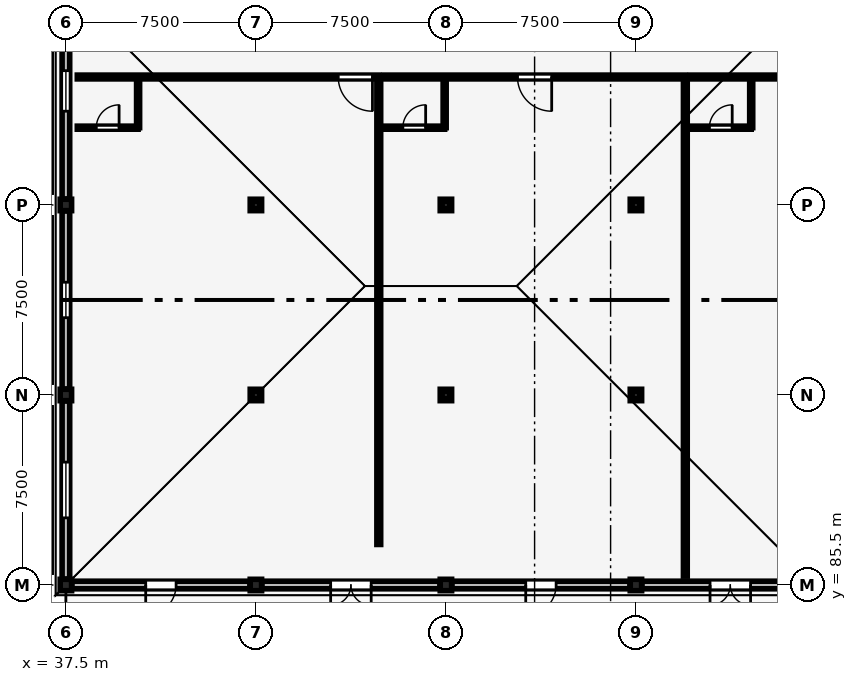
"""IFC4 building model, lengths in metres.
Left out: names, types, materials, properties, quantities, classifications, styles, units other than length and angle.
Written with IfcOpenShell. Run it as: python <this file> out.ifc"""

import sys

from ifc_helpers import new_model, si_unit, direction, frame, frame_2d, origin, origin_2d, place, context, subcontext, project, spatial, rectangle, i_section, extrude, element, fill, save


model = new_model("IFC4")
c1 = context("Model", 3, precision=1e-05, world=origin(), true_north=direction((0.0, 1.0)))
c2 = subcontext(c1, "Body", "Model", "MODEL_VIEW")
j1 = project(units=[si_unit("LENGTHUNIT", "METRE"), si_unit("PLANEANGLEUNIT", "RADIAN")], contexts=[c1])
p1 = place(None, origin())
s1 = spatial("IfcSite", under=j1, at=p1, CompositionType="ELEMENT")
p2 = place(p1, origin())
s2 = spatial("IfcBuilding", under=s1, at=p2, CompositionType="ELEMENT")
p3 = place(p2, frame((0.0, 0.0, 17.85)))
s3 = spatial("IfcBuildingStorey", under=s2, at=p3, CompositionType="ELEMENT", Elevation=17.85)
for number, where, z_axis, x_axis in (
    (1, (37.5, 85.5, 0.0), (0.0, 0.0, 1.0), (1.0, 0.0, 0.0)),
    (2, (37.5, 93.0, 0.0), (0.0, 0.0, 1.0), (1.0, 0.0, 0.0)),
    (3, (37.5, 100.5, 0.0), (0.0, 0.0, 1.0), (1.0, 0.0, 0.0)),
    (4, (45.0, 85.5, 0.0), (0.0, 0.0, 1.0), (1.0, 0.0, 0.0)),
    (5, (45.0, 93.0, 0.0), (0.0, 0.0, 1.0), (1.0, 0.0, 0.0)),
    (6, (45.0, 100.5, 0.0), (0.0, 0.0, 1.0), (1.0, 0.0, 0.0)),
    (7, (52.5, 85.5, 0.0), (0.0, 0.0, 1.0), (1.0, 0.0, 0.0)),
    (8, (52.5, 93.0, 0.0), (0.0, 0.0, 1.0), (1.0, 0.0, 0.0)),
    (9, (52.5, 100.5, 0.0), (0.0, 0.0, 1.0), (1.0, 0.0, 0.0)),
    (10, (60.0, 85.5, 0.0), (0.0, 0.0, 1.0), (1.0, 0.0, 0.0)),
    (11, (60.0, 93.0, 0.0), (0.0, 0.0, 1.0), (1.0, 0.0, 0.0)),
    (12, (60.0, 100.5, 0.0), (0.0, 0.0, 1.0), (1.0, 0.0, 0.0)),
):
    element("IfcColumn", number, at=place(p3, frame(where, z_axis=z_axis, x_axis=x_axis)), inside=s3, PredefinedType="COLUMN", context=c2, shape_type="SweptSolid", body=[
        extrude(rectangle(XDim=0.45, YDim=0.45, at=origin_2d()), origin(), (0.0, 0.0, 1.0), 4.05),
    ])
for number, where, z_axis, x_axis in (
    (13, (45.0, 93.0, 4.05), (0.0, 0.0, 1.0), (1.0, 0.0, 0.0)),
    (14, (45.0, 100.5, 4.05), (0.0, 0.0, 1.0), (1.0, 0.0, 0.0)),
    (15, (52.5, 93.0, 4.05), (0.0, 0.0, 1.0), (1.0, 0.0, 0.0)),
):
    element("IfcColumn", number, at=place(p3, frame(where, z_axis=z_axis, x_axis=x_axis)), inside=s3, PredefinedType="COLUMN", context=c2, shape_type="SweptSolid", body=[
        extrude(i_section(OverallWidth=0.3, OverallDepth=0.3, WebThickness=0.011, FlangeThickness=0.019, FilletRadius=0.027, at=origin_2d()), origin(), (0.0, 0.0, 1.0), 1.97),
    ])
p4 = place(p3, frame((52.5, 100.5, 4.05), z_axis=(0.0, 0.0, 1.0), x_axis=(1.0, 0.0, 0.0)))
e16 = element("IfcColumn", 16, at=p4, inside=s3, PredefinedType="COLUMN", context=c2, shape_type="SweptSolid", body=[
    extrude(i_section(OverallWidth=0.3, OverallDepth=0.3, WebThickness=0.011, FlangeThickness=0.019, FilletRadius=0.027, at=origin_2d()), origin(), (0.0, 0.0, 1.0), 2.24),
])
for number, where, z_axis, x_axis in (
    (17, (60.0, 93.0, 4.05), (0.0, 0.0, 1.0), (1.0, 0.0, 0.0)),
    (18, (60.0, 100.5, 4.05), (0.0, 0.0, 1.0), (1.0, 0.0, 0.0)),
):
    element("IfcColumn", number, at=place(p3, frame(where, z_axis=z_axis, x_axis=x_axis)), inside=s3, PredefinedType="COLUMN", context=c2, shape_type="SweptSolid", body=[
        extrude(i_section(OverallWidth=0.3, OverallDepth=0.3, WebThickness=0.011, FlangeThickness=0.019, FilletRadius=0.027, at=origin_2d()), origin(), (0.0, 0.0, 1.0), 1.872),
    ])
p5 = place(p3, frame((44.765, 85.5, 0.0), z_axis=(0.0, 0.0, 1.0), x_axis=(-1.0, 0.0, 0.0)))
e19 = element("IfcWall", 19, at=p5, inside=s3, PredefinedType="STANDARD", context=c2, shape_type="SweptSolid", body=[
    extrude(rectangle(XDim=7.03, YDim=0.3, at=frame_2d((3.515, 0.0))), origin(), (0.0, 0.0, 1.0), 3.77),
])
p6 = place(p5, frame((2.915, 0.0, 0.0)))
e20 = element("IfcOpeningElement", 20, at=p6, cuts=e19, PredefinedType="OPENING", context=c2, shape_type="SweptSolid", body=[
    extrude(rectangle(XDim=1.2, YDim=2.3, at=frame_2d((0.6, 1.15))), frame((0.0, 0.16, 0.0), z_axis=(0.0, -1.0, 0.0), x_axis=(1.0, 0.0, 0.0)), (0.0, 0.0, 1.0), 0.32),
])
p7 = place(p3, frame((37.5, 85.735, 0.0), z_axis=(0.0, 0.0, 1.0), x_axis=(0.0, 1.0, 0.0)))
e21 = element("IfcWall", 21, at=p7, inside=s3, PredefinedType="STANDARD", context=c2, shape_type="SweptSolid", body=[
    extrude(rectangle(XDim=7.03, YDim=0.3, at=frame_2d((3.515, 0.0))), origin(), (0.0, 0.0, 1.0), 3.77),
])
p8 = place(p7, frame((2.415, 0.0, 0.9)))
e22 = element("IfcOpeningElement", 22, at=p8, cuts=e21, PredefinedType="OPENING", context=c2, shape_type="SweptSolid", body=[
    extrude(rectangle(XDim=2.2, YDim=1.95, at=frame_2d((1.1, 0.975))), frame((0.0, 0.16, 0.0), z_axis=(0.0, -1.0, 0.0), x_axis=(1.0, 0.0, 0.0)), (0.0, 0.0, 1.0), 0.32),
])
p9 = place(p3, frame((37.5, 93.235, 0.0), z_axis=(0.0, 0.0, 1.0), x_axis=(0.0, 1.0, 0.0)))
e23 = element("IfcWall", 23, at=p9, inside=s3, PredefinedType="STANDARD", context=c2, shape_type="SweptSolid", body=[
    extrude(rectangle(XDim=7.03, YDim=0.3, at=frame_2d((3.515, 0.0))), origin(), (0.0, 0.0, 1.0), 3.77),
])
p10 = place(p9, frame((2.815, 0.0, 0.9)))
e24 = element("IfcOpeningElement", 24, at=p10, cuts=e23, PredefinedType="OPENING", context=c2, shape_type="SweptSolid", body=[
    extrude(rectangle(XDim=1.4, YDim=1.8, at=frame_2d((0.7, 0.9))), frame((0.0, 0.16, 0.0), z_axis=(0.0, -1.0, 0.0), x_axis=(1.0, 0.0, 0.0)), (0.0, 0.0, 1.0), 0.32),
])
p11 = place(p3, frame((37.5, 100.735, 0.0), z_axis=(0.0, 0.0, 1.0), x_axis=(0.0, 1.0, 0.0)))
e25 = element("IfcWall", 25, at=p11, inside=s3, PredefinedType="STANDARD", context=c2, shape_type="SweptSolid", body=[
    extrude(rectangle(XDim=8.53, YDim=0.3, at=frame_2d((4.265, 0.0))), origin(), (0.0, 0.0, 1.0), 3.77),
])
p12 = place(p11, frame((3.465, 0.0, 0.9)))
e26 = element("IfcOpeningElement", 26, at=p12, cuts=e25, PredefinedType="OPENING", context=c2, shape_type="SweptSolid", body=[
    extrude(rectangle(XDim=1.6, YDim=1.8, at=frame_2d((0.8, 0.9))), frame((0.0, 0.16, 0.0), z_axis=(0.0, -1.0, 0.0), x_axis=(1.0, 0.0, 0.0)), (0.0, 0.0, 1.0), 0.32),
])
p13 = place(p3, frame((52.265, 85.5, 0.0), z_axis=(0.0, 0.0, 1.0), x_axis=(-1.0, 0.0, 0.0)))
e27 = element("IfcWall", 27, at=p13, inside=s3, PredefinedType="STANDARD", context=c2, shape_type="SweptSolid", body=[
    extrude(rectangle(XDim=7.03, YDim=0.3, at=frame_2d((3.515, 0.0))), origin(), (0.0, 0.0, 1.0), 3.77),
])
p14 = place(p13, frame((2.715, 0.0, 0.0)))
e28 = element("IfcOpeningElement", 28, at=p14, cuts=e27, PredefinedType="OPENING", context=c2, shape_type="SweptSolid", body=[
    extrude(rectangle(XDim=1.6, YDim=2.35, at=frame_2d((0.8, 1.175))), frame((0.0, 0.16, 0.0), z_axis=(0.0, -1.0, 0.0), x_axis=(1.0, 0.0, 0.0)), (0.0, 0.0, 1.0), 0.32),
])
p15 = place(p3, frame((59.765, 85.5, 0.0), z_axis=(0.0, 0.0, 1.0), x_axis=(-1.0, 0.0, 0.0)))
e29 = element("IfcWall", 29, at=p15, inside=s3, PredefinedType="STANDARD", context=c2, shape_type="SweptSolid", body=[
    extrude(rectangle(XDim=7.03, YDim=0.3, at=frame_2d((3.515, 0.0))), origin(), (0.0, 0.0, 1.0), 3.77),
])
p16 = place(p15, frame((2.915, 0.0, 0.0)))
e30 = element("IfcOpeningElement", 30, at=p16, cuts=e29, PredefinedType="OPENING", context=c2, shape_type="SweptSolid", body=[
    extrude(rectangle(XDim=1.2, YDim=2.3, at=frame_2d((0.6, 1.15))), frame((0.0, 0.16, 0.0), z_axis=(0.0, -1.0, 0.0), x_axis=(1.0, 0.0, 0.0)), (0.0, 0.0, 1.0), 0.32),
])
p17 = place(p3, frame((67.215, 85.5, 0.0), z_axis=(0.0, 0.0, 1.0), x_axis=(-1.0, 0.0, 0.0)))
e31 = element("IfcWall", 31, at=p17, inside=s3, PredefinedType="STANDARD", context=c2, shape_type="SweptSolid", body=[
    extrude(rectangle(XDim=6.98, YDim=0.3, at=frame_2d((3.49, 0.0))), origin(), (0.0, 0.0, 1.0), 3.77),
])
p18 = place(p17, frame((2.69, 0.0, 0.0)))
e32 = element("IfcOpeningElement", 32, at=p18, cuts=e31, PredefinedType="OPENING", context=c2, shape_type="SweptSolid", body=[
    extrude(rectangle(XDim=1.6, YDim=2.35, at=frame_2d((0.8, 1.175))), frame((0.0, 0.16, 0.0), z_axis=(0.0, -1.0, 0.0), x_axis=(1.0, 0.0, 0.0)), (0.0, 0.0, 1.0), 0.32),
])
p19 = place(p3, frame((49.85, 105.55, 0.0), z_axis=(0.0, 0.0, 1.0), x_axis=(-1.0, 0.0, 0.0)))
e33 = element("IfcWall", 33, at=p19, inside=s3, PredefinedType="PARTITIONING", context=c2, shape_type="SweptSolid", body=[
    extrude(rectangle(XDim=11.9, YDim=0.15, at=frame_2d((5.95, 0.0))), origin(), (0.0, 0.0, 1.0), 3.755),
])
p20 = place(p19, frame((0.25, 0.0, 0.0)))
e34 = element("IfcOpeningElement", 34, at=p20, cuts=e33, PredefinedType="OPENING", context=c2, shape_type="SweptSolid", body=[
    extrude(rectangle(XDim=1.35, YDim=2.25, at=frame_2d((0.675, 1.125))), frame((0.0, 0.085, 0.0), z_axis=(0.0, -1.0, 0.0), x_axis=(1.0, 0.0, 0.0)), (0.0, 0.0, 1.0), 0.17),
])
p21 = place(p3, frame((37.95, 103.55, 0.0), z_axis=(0.0, 0.0, 1.0), x_axis=(1.0, 0.0, 0.0)))
e35 = element("IfcWall", 35, at=p21, inside=s3, PredefinedType="PARTITIONING", context=c2, shape_type="SweptSolid", body=[
    extrude(rectangle(XDim=2.4, YDim=0.12, at=frame_2d((1.2, 0.0))), origin(), (0.0, 0.0, 1.0), 3.755),
])
p22 = place(p21, frame((0.75, 0.0, 0.0)))
e36 = element("IfcOpeningElement", 36, at=p22, cuts=e35, PredefinedType="OPENING", context=c2, shape_type="SweptSolid", body=[
    extrude(rectangle(XDim=0.9, YDim=2.1, at=frame_2d((0.45, 1.05))), frame((0.0, 0.07, 0.0), z_axis=(0.0, -1.0, 0.0), x_axis=(1.0, 0.0, 0.0)), (0.0, 0.0, 1.0), 0.14),
])
p23 = place(p3, frame((40.35, 103.55, 0.0), z_axis=(0.0, 0.0, 1.0), x_axis=(0.0, 1.0, 0.0)))
e37 = element("IfcWall", 37, at=p23, inside=s3, PredefinedType="PARTITIONING", context=c2, shape_type="SweptSolid", body=[
    extrude(rectangle(XDim=2.0, YDim=0.12, at=frame_2d((1.0, 0.0))), origin(), (0.0, 0.0, 1.0), 3.755),
])
p24 = place(p3, frame((61.95, 105.55, 0.0), z_axis=(0.0, 0.0, 1.0), x_axis=(-1.0, 0.0, 0.0)))
e38 = element("IfcWall", 38, at=p24, inside=s3, PredefinedType="PARTITIONING", context=c2, shape_type="SweptSolid", body=[
    extrude(rectangle(XDim=11.9, YDim=0.15, at=frame_2d((5.95, 0.0))), origin(), (0.0, 0.0, 1.0), 3.755),
])
p25 = place(p24, frame((5.275, 0.0, 0.0)))
e39 = element("IfcOpeningElement", 39, at=p25, cuts=e38, PredefinedType="OPENING", context=c2, shape_type="SweptSolid", body=[
    extrude(rectangle(XDim=1.35, YDim=2.25, at=frame_2d((0.675, 1.125))), frame((0.0, 0.085, 0.0), z_axis=(0.0, -1.0, 0.0), x_axis=(1.0, 0.0, 0.0)), (0.0, 0.0, 1.0), 0.17),
])
p26 = place(p3, frame((50.05, 103.55, 0.0), z_axis=(0.0, 0.0, 1.0), x_axis=(1.0, 0.0, 0.0)))
e40 = element("IfcWall", 40, at=p26, inside=s3, PredefinedType="PARTITIONING", context=c2, shape_type="SweptSolid", body=[
    extrude(rectangle(XDim=2.4, YDim=0.12, at=frame_2d((1.2, 0.0))), origin(), (0.0, 0.0, 1.0), 3.755),
])
p27 = place(p26, frame((0.75, 0.0, 0.0)))
e41 = element("IfcOpeningElement", 41, at=p27, cuts=e40, PredefinedType="OPENING", context=c2, shape_type="SweptSolid", body=[
    extrude(rectangle(XDim=0.9, YDim=2.1, at=frame_2d((0.45, 1.05))), frame((0.0, 0.07, 0.0), z_axis=(0.0, -1.0, 0.0), x_axis=(1.0, 0.0, 0.0)), (0.0, 0.0, 1.0), 0.14),
])
p28 = place(p3, frame((52.45, 103.55, 0.0), z_axis=(0.0, 0.0, 1.0), x_axis=(0.0, 1.0, 0.0)))
e42 = element("IfcWall", 42, at=p28, inside=s3, PredefinedType="PARTITIONING", context=c2, shape_type="SweptSolid", body=[
    extrude(rectangle(XDim=2.0, YDim=0.12, at=frame_2d((1.0, 0.0))), origin(), (0.0, 0.0, 1.0), 3.755),
])
p29 = place(p3, frame((74.05, 105.55, 0.0), z_axis=(0.0, 0.0, 1.0), x_axis=(-1.0, 0.0, 0.0)))
e43 = element("IfcWall", 43, at=p29, inside=s3, PredefinedType="PARTITIONING", context=c2, shape_type="SweptSolid", body=[
    extrude(rectangle(XDim=11.9, YDim=0.15, at=frame_2d((5.95, 0.0))), origin(), (0.0, 0.0, 1.0), 3.755),
])
p30 = place(p29, frame((2.26, 0.0, 0.0)))
e44 = element("IfcOpeningElement", 44, at=p30, cuts=e43, PredefinedType="OPENING", context=c2, shape_type="SweptSolid", body=[
    extrude(rectangle(XDim=1.35, YDim=2.25, at=frame_2d((0.675, 1.125))), frame((0.0, 0.085, 0.0), z_axis=(0.0, -1.0, 0.0), x_axis=(1.0, 0.0, 0.0)), (0.0, 0.0, 1.0), 0.17),
])
p31 = place(p3, frame((62.15, 103.55, 0.0), z_axis=(0.0, 0.0, 1.0), x_axis=(1.0, 0.0, 0.0)))
e45 = element("IfcWall", 45, at=p31, inside=s3, PredefinedType="PARTITIONING", context=c2, shape_type="SweptSolid", body=[
    extrude(rectangle(XDim=2.4, YDim=0.12, at=frame_2d((1.2, 0.0))), origin(), (0.0, 0.0, 1.0), 3.755),
])
p32 = place(p31, frame((0.75, 0.0, 0.0)))
e46 = element("IfcOpeningElement", 46, at=p32, cuts=e45, PredefinedType="OPENING", context=c2, shape_type="SweptSolid", body=[
    extrude(rectangle(XDim=0.9, YDim=2.1, at=frame_2d((0.45, 1.05))), frame((0.0, 0.07, 0.0), z_axis=(0.0, -1.0, 0.0), x_axis=(1.0, 0.0, 0.0)), (0.0, 0.0, 1.0), 0.14),
])
p33 = place(p3, frame((64.55, 103.55, 0.0), z_axis=(0.0, 0.0, 1.0), x_axis=(0.0, 1.0, 0.0)))
e47 = element("IfcWall", 47, at=p33, inside=s3, PredefinedType="PARTITIONING", context=c2, shape_type="SweptSolid", body=[
    extrude(rectangle(XDim=2.0, YDim=0.12, at=frame_2d((1.0, 0.0))), origin(), (0.0, 0.0, 1.0), 3.755),
])
p34 = place(p3, frame((49.85, 87.1, 0.0), z_axis=(0.0, 0.0, 1.0), x_axis=(0.0, 1.0, 0.0)))
e48 = element("IfcWall", 48, at=p34, inside=s3, PredefinedType="PARTITIONING", context=c2, shape_type="SweptSolid", body=[
    extrude(rectangle(XDim=18.45, YDim=0.15, at=frame_2d((9.225, 0.0))), origin(), (0.0, 0.0, 1.0), 3.755),
])
p35 = place(p3, frame((61.95, 85.85, 0.0), z_axis=(0.0, 0.0, 1.0), x_axis=(0.0, 1.0, 0.0)))
e49 = element("IfcWall", 49, at=p35, inside=s3, PredefinedType="PARTITIONING", context=c2, shape_type="SweptSolid", body=[
    extrude(rectangle(XDim=19.7, YDim=0.15, at=frame_2d((9.85, 0.0))), origin(), (0.0, 0.0, 1.0), 3.755),
])
p36 = place(p6, origin())
e50 = element("IfcDoor", 50, at=p36, inside=s3, OperationType="SINGLE_SWING_RIGHT", PredefinedType="DOOR", context=c2, shape_type="SweptSolid", body=[
    extrude(rectangle(XDim=1.2, YDim=2.3, at=frame_2d((0.6, 1.15))), frame((0.0, 0.025, 0.0), z_axis=(0.0, -1.0, 0.0), x_axis=(1.0, 0.0, 0.0)), (0.0, 0.0, 1.0), 0.05),
])
fill(e20, e50)
p37 = place(p8, origin())
e51 = element("IfcWindow", 51, at=p37, inside=s3, PartitioningType="SINGLE_PANEL", PredefinedType="WINDOW", context=c2, shape_type="SweptSolid", body=[
    extrude(rectangle(XDim=2.2, YDim=1.95, at=frame_2d((1.1, 0.975))), frame((0.0, 0.03, 0.0), z_axis=(0.0, -1.0, 0.0), x_axis=(1.0, 0.0, 0.0)), (0.0, 0.0, 1.0), 0.06),
])
fill(e22, e51)
p38 = place(p10, origin())
e52 = element("IfcWindow", 52, at=p38, inside=s3, PartitioningType="SINGLE_PANEL", PredefinedType="WINDOW", context=c2, shape_type="SweptSolid", body=[
    extrude(rectangle(XDim=1.4, YDim=1.8, at=frame_2d((0.7, 0.9))), frame((0.0, 0.03, 0.0), z_axis=(0.0, -1.0, 0.0), x_axis=(1.0, 0.0, 0.0)), (0.0, 0.0, 1.0), 0.06),
])
fill(e24, e52)
p39 = place(p12, origin())
e53 = element("IfcWindow", 53, at=p39, inside=s3, PartitioningType="SINGLE_PANEL", PredefinedType="WINDOW", context=c2, shape_type="SweptSolid", body=[
    extrude(rectangle(XDim=1.6, YDim=1.8, at=frame_2d((0.8, 0.9))), frame((0.0, 0.03, 0.0), z_axis=(0.0, -1.0, 0.0), x_axis=(1.0, 0.0, 0.0)), (0.0, 0.0, 1.0), 0.06),
])
fill(e26, e53)
p40 = place(p14, origin())
e54 = element("IfcDoor", 54, at=p40, inside=s3, OperationType="DOUBLE_DOOR_SINGLE_SWING", PredefinedType="DOOR", context=c2, shape_type="SweptSolid", body=[
    extrude(rectangle(XDim=1.6, YDim=2.35, at=frame_2d((0.8, 1.175))), frame((0.0, 0.025, 0.0), z_axis=(0.0, -1.0, 0.0), x_axis=(1.0, 0.0, 0.0)), (0.0, 0.0, 1.0), 0.05),
])
fill(e28, e54)
p41 = place(p16, origin())
e55 = element("IfcDoor", 55, at=p41, inside=s3, OperationType="SINGLE_SWING_RIGHT", PredefinedType="DOOR", context=c2, shape_type="SweptSolid", body=[
    extrude(rectangle(XDim=1.2, YDim=2.3, at=frame_2d((0.6, 1.15))), frame((0.0, 0.025, 0.0), z_axis=(0.0, -1.0, 0.0), x_axis=(1.0, 0.0, 0.0)), (0.0, 0.0, 1.0), 0.05),
])
fill(e30, e55)
p42 = place(p18, origin())
e56 = element("IfcDoor", 56, at=p42, inside=s3, OperationType="DOUBLE_DOOR_SINGLE_SWING", PredefinedType="DOOR", context=c2, shape_type="SweptSolid", body=[
    extrude(rectangle(XDim=1.6, YDim=2.35, at=frame_2d((0.8, 1.175))), frame((0.0, 0.025, 0.0), z_axis=(0.0, -1.0, 0.0), x_axis=(1.0, 0.0, 0.0)), (0.0, 0.0, 1.0), 0.05),
])
fill(e32, e56)
p43 = place(p20, origin())
e57 = element("IfcDoor", 57, at=p43, inside=s3, OperationType="SINGLE_SWING_LEFT", PredefinedType="DOOR", context=c2, shape_type="SweptSolid", body=[
    extrude(rectangle(XDim=1.35, YDim=2.25, at=frame_2d((0.675, 1.125))), frame((0.0, 0.025, 0.0), z_axis=(0.0, -1.0, 0.0), x_axis=(1.0, 0.0, 0.0)), (0.0, 0.0, 1.0), 0.05),
])
fill(e34, e57)
p44 = place(p22, origin())
e58 = element("IfcDoor", 58, at=p44, inside=s3, OperationType="SINGLE_SWING_RIGHT", PredefinedType="DOOR", context=c2, shape_type="SweptSolid", body=[
    extrude(rectangle(XDim=0.9, YDim=2.1, at=frame_2d((0.45, 1.05))), frame((0.0, 0.025, 0.0), z_axis=(0.0, -1.0, 0.0), x_axis=(1.0, 0.0, 0.0)), (0.0, 0.0, 1.0), 0.05),
])
fill(e36, e58)
p45 = place(p25, origin())
e59 = element("IfcDoor", 59, at=p45, inside=s3, OperationType="SINGLE_SWING_LEFT", PredefinedType="DOOR", context=c2, shape_type="SweptSolid", body=[
    extrude(rectangle(XDim=1.35, YDim=2.25, at=frame_2d((0.675, 1.125))), frame((0.0, 0.025, 0.0), z_axis=(0.0, -1.0, 0.0), x_axis=(1.0, 0.0, 0.0)), (0.0, 0.0, 1.0), 0.05),
])
fill(e39, e59)
p46 = place(p27, origin())
e60 = element("IfcDoor", 60, at=p46, inside=s3, OperationType="SINGLE_SWING_RIGHT", PredefinedType="DOOR", context=c2, shape_type="SweptSolid", body=[
    extrude(rectangle(XDim=0.9, YDim=2.1, at=frame_2d((0.45, 1.05))), frame((0.0, 0.025, 0.0), z_axis=(0.0, -1.0, 0.0), x_axis=(1.0, 0.0, 0.0)), (0.0, 0.0, 1.0), 0.05),
])
fill(e41, e60)
p47 = place(p32, origin())
e61 = element("IfcDoor", 61, at=p47, inside=s3, OperationType="SINGLE_SWING_RIGHT", PredefinedType="DOOR", context=c2, shape_type="SweptSolid", body=[
    extrude(rectangle(XDim=0.9, YDim=2.1, at=frame_2d((0.45, 1.05))), frame((0.0, 0.025, 0.0), z_axis=(0.0, -1.0, 0.0), x_axis=(1.0, 0.0, 0.0)), (0.0, 0.0, 1.0), 0.05),
])
fill(e46, e61)
save(model, sys.argv[1])
